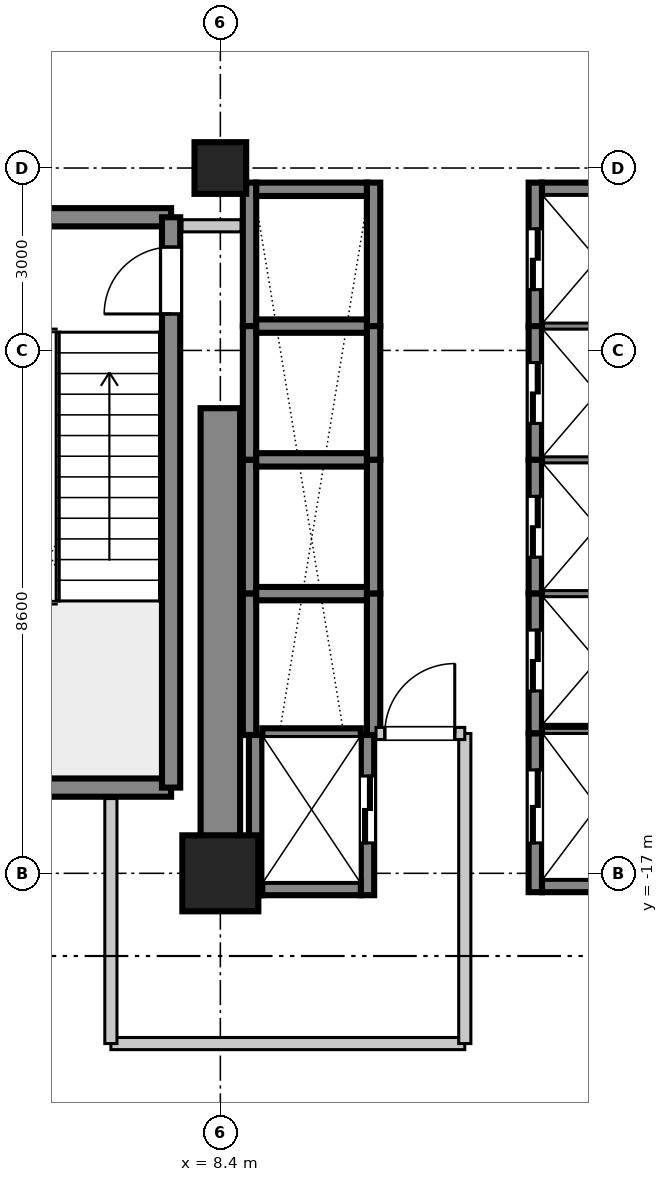
"""IFC4 building model, lengths in metres.
Left out: names, types, materials, properties, quantities, classifications, styles, units other than length and angle.
Written with IfcOpenShell. Run it as: python <this file> out.ifc"""

import sys

from ifc_helpers import new_model, si_unit, direction, frame, frame_2d, origin, origin_2d, place, context, subcontext, project, spatial, rectangle, extrude, source, transform, mapped, element, fill, save


model = new_model("IFC4")
c1 = context("Model", 3, precision=1e-05, world=origin(), true_north=direction((0.0, 1.0)))
c2 = subcontext(c1, "Body", "Model", "MODEL_VIEW")
j1 = project(units=[si_unit("LENGTHUNIT", "METRE"), si_unit("PLANEANGLEUNIT", "RADIAN")], contexts=[c1])
p1 = place(None, origin())
s1 = spatial("IfcSite", under=j1, at=p1, CompositionType="ELEMENT")
p2 = place(p1, origin())
s2 = spatial("IfcBuilding", under=s1, at=p2, CompositionType="ELEMENT")
p3 = place(p2, frame((0.0, 0.0, 144.2)))
s3 = spatial("IfcBuildingStorey", under=s2, at=p3, CompositionType="ELEMENT", Elevation=144.2)
m1 = source(origin(), c2, "Body", "SweptSolid", [
    extrude(rectangle(XDim=1.25, YDim=1.25, at=origin_2d()), origin(), (0.0, 0.0, 1.0), 4.755),
])
p4 = place(p3, frame((8.4, -17.0, 0.0), z_axis=(0.0, 0.0, 1.0), x_axis=(1.0, 0.0, 0.0)))
e1 = element("IfcColumn", 1, at=p4, inside=s3, PredefinedType="COLUMN", context=c2, shape_type="MappedRepresentation", body=[
    mapped(m1, transform((0.0, 0.0, 0.0), scale=1.0)),
])
m2 = source(origin(), c2, "Body", "SweptSolid", [
    extrude(rectangle(XDim=0.85, YDim=0.85, at=origin_2d()), origin(), (0.0, 0.0, 1.0), 4.755),
])
p5 = place(p3, frame((8.4, -5.4, 0.0), z_axis=(0.0, 0.0, 1.0), x_axis=(1.0, 0.0, 0.0)))
e2 = element("IfcColumn", 2, at=p5, inside=s3, PredefinedType="PILASTER", context=c2, shape_type="MappedRepresentation", body=[
    mapped(m2, transform((0.0, 0.0, 0.0), scale=1.0)),
])
m3 = source(origin(), c2, "Body", "SweptSolid", [
    extrude(rectangle(XDim=7.65, YDim=0.65, at=frame_2d((3.825, 0.0))), origin(), (0.0, 0.0, 1.0), 4.54),
])
p6 = place(p3, frame((8.4, -17.0, 0.0), z_axis=(0.0, 0.0, 1.0), x_axis=(0.0, 1.0, 0.0)))
e3 = element("IfcWall", 3, at=p6, inside=s3, PredefinedType="SHEAR", context=c2, shape_type="MappedRepresentation", body=[
    mapped(m3, transform((0.0, 0.0, 0.0), scale=1.0)),
])
m4 = source(origin(), c2, "Body", "SweptSolid", [
    extrude(rectangle(XDim=3.98, YDim=0.3, at=frame_2d((1.99, 0.0))), origin(), (0.0, 0.0, 1.0), 4.54),
])
for number, where, z_axis, x_axis in (
    (4, (3.61, -15.59, 0.0), (0.0, 0.0, 1.0), (1.0, 0.0, 0.0)),
    (5, (3.61, -6.21, 0.0), (0.0, 0.0, 1.0), (1.0, 0.0, 0.0)),
):
    element("IfcWall", number, at=place(p3, frame(where, z_axis=z_axis, x_axis=x_axis)), inside=s3, PredefinedType="SHEAR", context=c2, shape_type="MappedRepresentation", body=[
        mapped(m4, transform((0.0, 0.0, 0.0), scale=1.0)),
    ])
m5 = source(origin(), c2, "Body", "SweptSolid", [
    extrude(rectangle(XDim=9.38, YDim=0.3, at=frame_2d((4.69, 0.0))), origin(), (0.0, 0.0, 1.0), 4.54),
])
p7 = place(p3, frame((7.59, -15.59, 0.0), z_axis=(0.0, 0.0, 1.0), x_axis=(0.0, 1.0, 0.0)))
e6 = element("IfcWall", 6, at=p7, inside=s3, PredefinedType="SHEAR", context=c2, shape_type="MappedRepresentation", body=[
    mapped(m5, transform((0.0, 0.0, 0.0), scale=1.0)),
])
p8 = place(p7, frame((7.79, 0.0, 0.0)))
e7 = element("IfcOpeningElement", 7, at=p8, cuts=e6, PredefinedType="OPENING", context=c2, shape_type="SweptSolid", body=[
    extrude(rectangle(XDim=1.1, YDim=2.15, at=frame_2d((0.55, 1.075))), frame((0.0, 0.16, 0.0), z_axis=(0.0, -1.0, 0.0), x_axis=(1.0, 0.0, 0.0)), (0.0, 0.0, 1.0), 0.32),
])
m6 = source(origin(), c2, "Body", "SweptSolid", [
    extrude(rectangle(XDim=2.36, YDim=0.22, at=frame_2d((1.18, 0.0))), origin(), (0.0, 0.0, 1.0), 4.54),
])
p9 = place(p3, frame((13.58, -8.0, 0.0), z_axis=(0.0, 0.0, 1.0), x_axis=(0.0, 1.0, 0.0)))
e8 = element("IfcWall", 8, at=p9, inside=s3, PredefinedType="SHEAR", context=c2, shape_type="MappedRepresentation", body=[
    mapped(m6, transform((0.0, 0.0, 0.0), scale=1.0)),
])
p10 = place(p9, frame((0.6, 0.0, 0.0)))
e9 = element("IfcOpeningElement", 9, at=p10, cuts=e8, PredefinedType="OPENING", context=c2, shape_type="SweptSolid", body=[
    extrude(rectangle(XDim=1.0, YDim=2.2, at=frame_2d((0.5, 1.1))), frame((0.0, 0.12, 0.0), z_axis=(0.0, -1.0, 0.0), x_axis=(1.0, 0.0, 0.0)), (0.0, 0.0, 1.0), 0.24),
])
m7 = source(origin(), c2, "Body", "SweptSolid", [
    extrude(rectangle(XDim=1.82, YDim=0.22, at=frame_2d((0.91, 0.0))), origin(), (0.0, 0.0, 1.0), 4.54),
])
p11 = place(p3, frame((13.69, -5.75, 0.0), z_axis=(0.0, 0.0, 1.0), x_axis=(1.0, 0.0, 0.0)))
e10 = element("IfcWall", 10, at=p11, inside=s3, PredefinedType="SHEAR", context=c2, shape_type="MappedRepresentation", body=[
    mapped(m7, transform((0.0, 0.0, 0.0), scale=1.0)),
])
m8 = source(origin(), c2, "Body", "SweptSolid", [
    extrude(rectangle(XDim=2.2, YDim=0.22, at=frame_2d((1.1, 0.0))), origin(), (0.0, 0.0, 1.0), 4.54),
])
p12 = place(p3, frame((13.58, -10.2, 0.0), z_axis=(0.0, 0.0, 1.0), x_axis=(0.0, 1.0, 0.0)))
e11 = element("IfcWall", 11, at=p12, inside=s3, PredefinedType="SHEAR", context=c2, shape_type="MappedRepresentation", body=[
    mapped(m8, transform((0.0, 0.0, 0.0), scale=1.0)),
])
p13 = place(p12, frame((0.6, 0.0, 0.0)))
e12 = element("IfcOpeningElement", 12, at=p13, cuts=e11, PredefinedType="OPENING", context=c2, shape_type="SweptSolid", body=[
    extrude(rectangle(XDim=1.0, YDim=2.2, at=frame_2d((0.5, 1.1))), frame((0.0, 0.12, 0.0), z_axis=(0.0, -1.0, 0.0), x_axis=(1.0, 0.0, 0.0)), (0.0, 0.0, 1.0), 0.24),
])
m9 = source(origin(), c2, "Body", "SweptSolid", [
    extrude(rectangle(XDim=1.82, YDim=0.22, at=frame_2d((0.91, 0.0))), origin(), (0.0, 0.0, 1.0), 4.8),
])
p14 = place(p3, frame((13.69, -8.0, 0.0), z_axis=(0.0, 0.0, 1.0), x_axis=(1.0, 0.0, 0.0)))
e13 = element("IfcWall", 13, at=p14, inside=s3, PredefinedType="SHEAR", context=c2, shape_type="MappedRepresentation", body=[
    mapped(m9, transform((0.0, 0.0, 0.0), scale=1.0)),
])
p15 = place(p3, frame((13.58, -12.4, 0.0), z_axis=(0.0, 0.0, 1.0), x_axis=(0.0, 1.0, 0.0)))
e14 = element("IfcWall", 14, at=p15, inside=s3, PredefinedType="SHEAR", context=c2, shape_type="MappedRepresentation", body=[
    mapped(m8, transform((0.0, 0.0, 0.0), scale=1.0)),
])
p16 = place(p15, frame((0.6, 0.0, 0.0)))
e15 = element("IfcOpeningElement", 15, at=p16, cuts=e14, PredefinedType="OPENING", context=c2, shape_type="SweptSolid", body=[
    extrude(rectangle(XDim=1.0, YDim=2.2, at=frame_2d((0.5, 1.1))), frame((0.0, 0.12, 0.0), z_axis=(0.0, -1.0, 0.0), x_axis=(1.0, 0.0, 0.0)), (0.0, 0.0, 1.0), 0.24),
])
p17 = place(p3, frame((13.69, -10.2, 0.0), z_axis=(0.0, 0.0, 1.0), x_axis=(1.0, 0.0, 0.0)))
e16 = element("IfcWall", 16, at=p17, inside=s3, PredefinedType="SHEAR", context=c2, shape_type="MappedRepresentation", body=[
    mapped(m9, transform((0.0, 0.0, 0.0), scale=1.0)),
])
m10 = source(origin(), c2, "Body", "SweptSolid", [
    extrude(rectangle(XDim=2.3, YDim=0.22, at=frame_2d((1.15, 0.0))), origin(), (0.0, 0.0, 1.0), 4.54),
])
p18 = place(p3, frame((13.58, -14.7, 0.0), z_axis=(0.0, 0.0, 1.0), x_axis=(0.0, 1.0, 0.0)))
e17 = element("IfcWall", 17, at=p18, inside=s3, PredefinedType="SHEAR", context=c2, shape_type="MappedRepresentation", body=[
    mapped(m10, transform((0.0, 0.0, 0.0), scale=1.0)),
])
p19 = place(p18, frame((0.7, 0.0, 0.0)))
e18 = element("IfcOpeningElement", 18, at=p19, cuts=e17, PredefinedType="OPENING", context=c2, shape_type="SweptSolid", body=[
    extrude(rectangle(XDim=1.0, YDim=2.2, at=frame_2d((0.5, 1.1))), frame((0.0, 0.12, 0.0), z_axis=(0.0, -1.0, 0.0), x_axis=(1.0, 0.0, 0.0)), (0.0, 0.0, 1.0), 0.24),
])
p20 = place(p3, frame((13.69, -12.4, 0.0), z_axis=(0.0, 0.0, 1.0), x_axis=(1.0, 0.0, 0.0)))
e19 = element("IfcWall", 19, at=p20, inside=s3, PredefinedType="SHEAR", context=c2, shape_type="MappedRepresentation", body=[
    mapped(m9, transform((0.0, 0.0, 0.0), scale=1.0)),
])
for number, where, z_axis, x_axis in (
    (20, (8.88, -8.0, 0.0), (0.0, 0.0, 1.0), (0.0, 1.0, 0.0)),
    (21, (10.92, -8.0, 0.0), (0.0, 0.0, 1.0), (0.0, 1.0, 0.0)),
):
    element("IfcWall", number, at=place(p3, frame(where, z_axis=z_axis, x_axis=x_axis)), inside=s3, PredefinedType="SHEAR", context=c2, shape_type="MappedRepresentation", body=[
        mapped(m6, transform((0.0, 0.0, 0.0), scale=1.0)),
    ])
p21 = place(p3, frame((8.99, -5.75, 0.0), z_axis=(0.0, 0.0, 1.0), x_axis=(1.0, 0.0, 0.0)))
e22 = element("IfcWall", 22, at=p21, inside=s3, PredefinedType="SHEAR", context=c2, shape_type="MappedRepresentation", body=[
    mapped(m7, transform((0.0, 0.0, 0.0), scale=1.0)),
])
for number, where, z_axis, x_axis in (
    (23, (8.88, -10.2, 0.0), (0.0, 0.0, 1.0), (0.0, 1.0, 0.0)),
    (24, (10.92, -10.2, 0.0), (0.0, 0.0, 1.0), (0.0, 1.0, 0.0)),
):
    element("IfcWall", number, at=place(p3, frame(where, z_axis=z_axis, x_axis=x_axis)), inside=s3, PredefinedType="SHEAR", context=c2, shape_type="MappedRepresentation", body=[
        mapped(m8, transform((0.0, 0.0, 0.0), scale=1.0)),
    ])
p22 = place(p3, frame((8.99, -8.0, 0.0), z_axis=(0.0, 0.0, 1.0), x_axis=(1.0, 0.0, 0.0)))
e25 = element("IfcWall", 25, at=p22, inside=s3, PredefinedType="SHEAR", context=c2, shape_type="MappedRepresentation", body=[
    mapped(m9, transform((0.0, 0.0, 0.0), scale=1.0)),
])
for number, where, z_axis, x_axis in (
    (26, (8.88, -12.4, 0.0), (0.0, 0.0, 1.0), (0.0, 1.0, 0.0)),
    (27, (10.92, -12.4, 0.0), (0.0, 0.0, 1.0), (0.0, 1.0, 0.0)),
):
    element("IfcWall", number, at=place(p3, frame(where, z_axis=z_axis, x_axis=x_axis)), inside=s3, PredefinedType="SHEAR", context=c2, shape_type="MappedRepresentation", body=[
        mapped(m8, transform((0.0, 0.0, 0.0), scale=1.0)),
    ])
p23 = place(p3, frame((8.99, -10.2, 0.0), z_axis=(0.0, 0.0, 1.0), x_axis=(1.0, 0.0, 0.0)))
e28 = element("IfcWall", 28, at=p23, inside=s3, PredefinedType="SHEAR", context=c2, shape_type="MappedRepresentation", body=[
    mapped(m9, transform((0.0, 0.0, 0.0), scale=1.0)),
])
m11 = source(origin(), c2, "Body", "SweptSolid", [
    extrude(rectangle(XDim=2.325, YDim=0.22, at=frame_2d((1.163, 0.0))), origin(), (0.0, 0.0, 1.0), 4.54),
])
for number, where, z_axis, x_axis in (
    (29, (8.88, -14.725, 0.0), (0.0, 0.0, 1.0), (0.0, 1.0, 0.0)),
    (30, (10.92, -14.725, 0.0), (0.0, 0.0, 1.0), (0.0, 1.0, 0.0)),
):
    element("IfcWall", number, at=place(p3, frame(where, z_axis=z_axis, x_axis=x_axis)), inside=s3, PredefinedType="SHEAR", context=c2, shape_type="MappedRepresentation", body=[
        mapped(m11, transform((0.0, 0.0, 0.0), scale=1.0)),
    ])
p24 = place(p3, frame((8.99, -12.4, 0.0), z_axis=(0.0, 0.0, 1.0), x_axis=(1.0, 0.0, 0.0)))
e31 = element("IfcWall", 31, at=p24, inside=s3, PredefinedType="SHEAR", context=c2, shape_type="MappedRepresentation", body=[
    mapped(m9, transform((0.0, 0.0, 0.0), scale=1.0)),
])
m12 = source(origin(), c2, "Body", "SweptSolid", [
    extrude(rectangle(XDim=2.635, YDim=0.22, at=frame_2d((1.317, 0.0))), origin(), (0.0, 0.0, 1.0), 4.54),
])
p25 = place(p3, frame((8.98, -17.36, 0.0), z_axis=(0.0, 0.0, 1.0), x_axis=(0.0, 1.0, 0.0)))
e32 = element("IfcWall", 32, at=p25, inside=s3, PredefinedType="SHEAR", context=c2, shape_type="MappedRepresentation", body=[
    mapped(m12, transform((0.0, 0.0, 0.0), scale=1.0)),
])
p26 = place(p3, frame((10.82, -17.36, 0.0), z_axis=(0.0, 0.0, 1.0), x_axis=(0.0, 1.0, 0.0)))
e33 = element("IfcWall", 33, at=p26, inside=s3, PredefinedType="SHEAR", context=c2, shape_type="MappedRepresentation", body=[
    mapped(m12, transform((0.0, 0.0, 0.0), scale=1.0)),
])
p27 = place(p26, frame((0.86, 0.0, 0.0)))
e34 = element("IfcOpeningElement", 34, at=p27, cuts=e33, PredefinedType="OPENING", context=c2, shape_type="SweptSolid", body=[
    extrude(rectangle(XDim=1.1, YDim=2.2, at=frame_2d((0.55, 1.1))), frame((0.0, 0.12, 0.0), z_axis=(0.0, -1.0, 0.0), x_axis=(1.0, 0.0, 0.0)), (0.0, 0.0, 1.0), 0.24),
])
m13 = source(origin(), c2, "Body", "SweptSolid", [
    extrude(rectangle(XDim=1.62, YDim=0.22, at=frame_2d((0.81, 0.0))), origin(), (0.0, 0.0, 1.0), 4.54),
])
p28 = place(p3, frame((9.09, -17.25, 0.0), z_axis=(0.0, 0.0, 1.0), x_axis=(1.0, 0.0, 0.0)))
e35 = element("IfcWall", 35, at=p28, inside=s3, PredefinedType="SHEAR", context=c2, shape_type="MappedRepresentation", body=[
    mapped(m13, transform((0.0, 0.0, 0.0), scale=1.0)),
])
m14 = source(origin(), c2, "Body", "SweptSolid", [
    extrude(rectangle(XDim=1.62, YDim=0.22, at=frame_2d((0.81, 0.0))), origin(), (0.0, 0.0, 1.0), 4.8),
])
p29 = place(p3, frame((9.09, -14.725, 0.0), z_axis=(0.0, 0.0, 1.0), x_axis=(1.0, 0.0, 0.0)))
e36 = element("IfcWall", 36, at=p29, inside=s3, PredefinedType="SHEAR", context=c2, shape_type="MappedRepresentation", body=[
    mapped(m14, transform((0.0, 0.0, 0.0), scale=1.0)),
])
m15 = source(origin(), c2, "Body", "SweptSolid", [
    extrude(rectangle(XDim=2.61, YDim=0.22, at=frame_2d((1.305, 0.0))), origin(), (0.0, 0.0, 1.0), 4.54),
])
p30 = place(p3, frame((13.58, -17.31, 0.0), z_axis=(0.0, 0.0, 1.0), x_axis=(0.0, 1.0, 0.0)))
e37 = element("IfcWall", 37, at=p30, inside=s3, PredefinedType="SHEAR", context=c2, shape_type="MappedRepresentation", body=[
    mapped(m15, transform((0.0, 0.0, 0.0), scale=1.0)),
])
p31 = place(p30, frame((0.81, 0.0, 0.0)))
e38 = element("IfcOpeningElement", 38, at=p31, cuts=e37, PredefinedType="OPENING", context=c2, shape_type="SweptSolid", body=[
    extrude(rectangle(XDim=1.2, YDim=2.2, at=frame_2d((0.6, 1.1))), frame((0.0, 0.12, 0.0), z_axis=(0.0, -1.0, 0.0), x_axis=(1.0, 0.0, 0.0)), (0.0, 0.0, 1.0), 0.24),
])
p32 = place(p3, frame((13.69, -17.2, 0.0), z_axis=(0.0, 0.0, 1.0), x_axis=(1.0, 0.0, 0.0)))
e39 = element("IfcWall", 39, at=p32, inside=s3, PredefinedType="SHEAR", context=c2, shape_type="MappedRepresentation", body=[
    mapped(m7, transform((0.0, 0.0, 0.0), scale=1.0)),
])
p33 = place(p3, frame((13.69, -14.7, 0.0), z_axis=(0.0, 0.0, 1.0), x_axis=(1.0, 0.0, 0.0)))
e40 = element("IfcWall", 40, at=p33, inside=s3, PredefinedType="SHEAR", context=c2, shape_type="MappedRepresentation", body=[
    mapped(m9, transform((0.0, 0.0, 0.0), scale=1.0)),
])
m16 = source(origin(), c2, "Body", "SweptSolid", [
    extrude(rectangle(XDim=5.82, YDim=0.2, at=frame_2d((2.91, 0.0))), origin(), (0.0, 0.0, 1.0), 3.4),
])
p34 = place(p3, frame((6.6, -19.8, 0.0), z_axis=(0.0, 0.0, 1.0), x_axis=(1.0, 0.0, 0.0)))
e41 = element("IfcWall", 41, at=p34, inside=s3, PredefinedType="PARTITIONING", context=c2, shape_type="MappedRepresentation", body=[
    mapped(m16, transform((0.0, 0.0, 0.0), scale=1.0)),
])
m17 = source(origin(), c2, "Body", "SweptSolid", [
    extrude(rectangle(XDim=4.03, YDim=0.2, at=frame_2d((2.015, 0.0))), origin(), (0.0, 0.0, 1.0), 3.4),
])
p35 = place(p3, frame((6.6, -19.8, 0.0), z_axis=(0.0, 0.0, 1.0), x_axis=(0.0, 1.0, 0.0)))
e42 = element("IfcWall", 42, at=p35, inside=s3, PredefinedType="PARTITIONING", context=c2, shape_type="MappedRepresentation", body=[
    mapped(m17, transform((0.0, 0.0, 0.0), scale=1.0)),
])
m18 = source(origin(), c2, "Body", "SweptSolid", [
    extrude(rectangle(XDim=5.1, YDim=0.2, at=frame_2d((2.55, 0.0))), origin(), (0.0, 0.0, 1.0), 3.4),
])
p36 = place(p3, frame((12.42, -19.8, 0.0), z_axis=(0.0, 0.0, 1.0), x_axis=(0.0, 1.0, 0.0)))
e43 = element("IfcWall", 43, at=p36, inside=s3, PredefinedType="PARTITIONING", context=c2, shape_type="MappedRepresentation", body=[
    mapped(m18, transform((0.0, 0.0, 0.0), scale=1.0)),
])
m19 = source(origin(), c2, "Body", "SweptSolid", [
    extrude(rectangle(XDim=1.46, YDim=0.2, at=frame_2d((0.73, 0.0))), origin(), (0.0, 0.0, 1.0), 3.4),
])
p37 = place(p3, frame((10.96, -14.7, 0.0), z_axis=(0.0, 0.0, 1.0), x_axis=(1.0, 0.0, 0.0)))
e44 = element("IfcWall", 44, at=p37, inside=s3, PredefinedType="PARTITIONING", context=c2, shape_type="MappedRepresentation", body=[
    mapped(m19, transform((0.0, 0.0, 0.0), scale=1.0)),
])
p38 = place(p37, frame((0.145, 0.0, 0.0)))
e45 = element("IfcOpeningElement", 45, at=p38, cuts=e44, PredefinedType="OPENING", context=c2, shape_type="SweptSolid", body=[
    extrude(rectangle(XDim=1.15, YDim=2.15, at=frame_2d((0.575, 1.075))), frame((0.0, 0.11, 0.0), z_axis=(0.0, -1.0, 0.0), x_axis=(1.0, 0.0, 0.0)), (0.0, 0.0, 1.0), 0.22),
])
m20 = source(origin(), c2, "Body", "SweptSolid", [
    extrude(rectangle(XDim=0.97, YDim=0.2, at=frame_2d((0.485, 0.0))), origin(), (0.0, 0.0, 1.0), 3.4),
])
p39 = place(p3, frame((7.77, -6.35, 0.0), z_axis=(0.0, 0.0, 1.0), x_axis=(1.0, 0.0, 0.0)))
e46 = element("IfcWall", 46, at=p39, inside=s3, PredefinedType="PARTITIONING", context=c2, shape_type="MappedRepresentation", body=[
    mapped(m20, transform((0.0, 0.0, 0.0), scale=1.0)),
])
m21 = source(origin(), c2, "Body", "SweptSolid", [
    extrude(rectangle(XDim=1.1, YDim=2.15, at=frame_2d((0.55, 1.075))), frame((0.0, 0.025, 0.0), z_axis=(0.0, -1.0, 0.0), x_axis=(1.0, 0.0, 0.0)), (0.0, 0.0, 1.0), 0.05),
])
p40 = place(p8, origin())
e47 = element("IfcDoor", 47, at=p40, inside=s3, OperationType="SINGLE_SWING_LEFT", PredefinedType="DOOR", context=c2, shape_type="MappedRepresentation", body=[
    mapped(m21, transform((0.0, 0.0, 0.0), scale=1.0)),
])
fill(e7, e47)
m22 = source(origin(), c2, "Body", "SweptSolid", [
    extrude(rectangle(XDim=1.0, YDim=2.2, at=frame_2d((0.5, 1.1))), frame((0.0, 0.025, 0.0), z_axis=(0.0, -1.0, 0.0), x_axis=(1.0, 0.0, 0.0)), (0.0, 0.0, 1.0), 0.05),
])
p41 = place(p10, origin())
e48 = element("IfcDoor", 48, at=p41, inside=s3, OperationType="DOUBLE_DOOR_SLIDING", PredefinedType="DOOR", context=c2, shape_type="MappedRepresentation", body=[
    mapped(m22, transform((0.0, 0.0, 0.0), scale=1.0)),
])
fill(e9, e48)
p42 = place(p13, origin())
e49 = element("IfcDoor", 49, at=p42, inside=s3, OperationType="DOUBLE_DOOR_SLIDING", PredefinedType="DOOR", context=c2, shape_type="MappedRepresentation", body=[
    mapped(m22, transform((0.0, 0.0, 0.0), scale=1.0)),
])
fill(e12, e49)
p43 = place(p16, origin())
e50 = element("IfcDoor", 50, at=p43, inside=s3, OperationType="DOUBLE_DOOR_SLIDING", PredefinedType="DOOR", context=c2, shape_type="MappedRepresentation", body=[
    mapped(m22, transform((0.0, 0.0, 0.0), scale=1.0)),
])
fill(e15, e50)
p44 = place(p19, origin())
e51 = element("IfcDoor", 51, at=p44, inside=s3, OperationType="DOUBLE_DOOR_SLIDING", PredefinedType="DOOR", context=c2, shape_type="MappedRepresentation", body=[
    mapped(m22, transform((0.0, 0.0, 0.0), scale=1.0)),
])
fill(e18, e51)
m23 = source(origin(), c2, "Body", "SweptSolid", [
    extrude(rectangle(XDim=1.1, YDim=2.2, at=frame_2d((0.55, 1.1))), frame((0.0, 0.025, 0.0), z_axis=(0.0, -1.0, 0.0), x_axis=(1.0, 0.0, 0.0)), (0.0, 0.0, 1.0), 0.05),
])
p45 = place(p27, frame((1.1, 0.0, 0.0), z_axis=(0.0, 0.0, 1.0), x_axis=(-1.0, 0.0, 0.0)))
e52 = element("IfcDoor", 52, at=p45, inside=s3, OperationType="DOUBLE_DOOR_SLIDING", PredefinedType="DOOR", context=c2, shape_type="MappedRepresentation", body=[
    mapped(m23, transform((0.0, 0.0, 0.0), scale=1.0)),
])
fill(e34, e52)
m24 = source(origin(), c2, "Body", "SweptSolid", [
    extrude(rectangle(XDim=1.2, YDim=2.2, at=frame_2d((0.6, 1.1))), frame((0.0, 0.025, 0.0), z_axis=(0.0, -1.0, 0.0), x_axis=(1.0, 0.0, 0.0)), (0.0, 0.0, 1.0), 0.05),
])
p46 = place(p31, origin())
e53 = element("IfcDoor", 53, at=p46, inside=s3, OperationType="DOUBLE_DOOR_SLIDING", PredefinedType="DOOR", context=c2, shape_type="MappedRepresentation", body=[
    mapped(m24, transform((0.0, 0.0, 0.0), scale=1.0)),
])
fill(e38, e53)
m25 = source(origin(), c2, "Body", "SweptSolid", [
    extrude(rectangle(XDim=1.15, YDim=2.15, at=frame_2d((0.575, 1.075))), frame((0.0, 0.025, 0.0), z_axis=(0.0, -1.0, 0.0), x_axis=(1.0, 0.0, 0.0)), (0.0, 0.0, 1.0), 0.05),
])
p47 = place(p38, origin())
e54 = element("IfcDoor", 54, at=p47, inside=s3, OperationType="SINGLE_SWING_RIGHT", PredefinedType="DOOR", context=c2, shape_type="MappedRepresentation", body=[
    mapped(m25, transform((0.0, 0.0, 0.0), scale=1.0)),
])
fill(e45, e54)
save(model, sys.argv[1])
